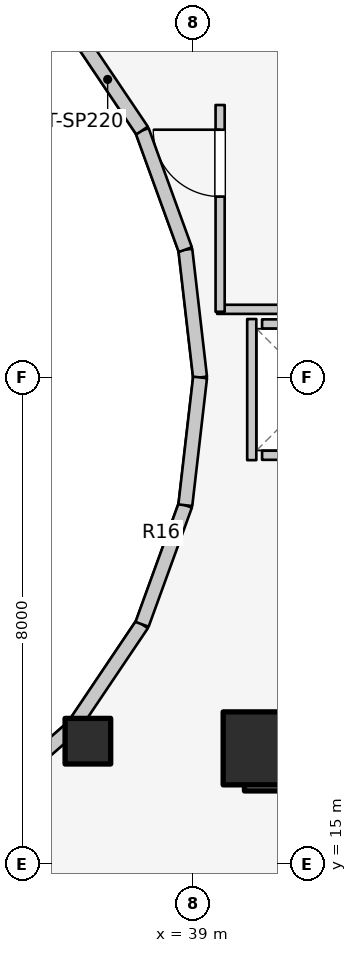
"""IFC4 building model, lengths in metres.
Left out: names, types, materials, properties, quantities, classifications, styles, units other than length and angle.
Written with IfcOpenShell. Run it as: python <this file> out.ifc"""

import sys

from ifc_helpers import new_model, si_unit, direction, frame, frame_2d, origin, origin_2d, place, context, subcontext, project, spatial, rectangle, extrude, element, fill, save


model = new_model("IFC4")
c1 = context("Model", 3, precision=1e-05, world=origin(), true_north=direction((0.0, 1.0)))
c2 = subcontext(c1, "Body", "Model", "MODEL_VIEW")
j1 = project(units=[si_unit("LENGTHUNIT", "METRE"), si_unit("PLANEANGLEUNIT", "RADIAN")], contexts=[c1])
p1 = place(None, origin())
s1 = spatial("IfcSite", under=j1, at=p1, CompositionType="ELEMENT")
p2 = place(p1, origin())
s2 = spatial("IfcBuilding", under=s1, at=p2, CompositionType="ELEMENT")
p3 = place(p2, frame((0.0, 0.0, 159.1)))
s3 = spatial("IfcBuildingStorey", under=s2, at=p3, CompositionType="ELEMENT", Elevation=159.1)
p4 = place(p3, frame((39.85, 16.55, 0.0), z_axis=(0.0, 0.0, 1.0), x_axis=(1.0, 0.0, 0.0)))
e1 = element("IfcWall", 1, at=p4, inside=s3, PredefinedType="SHEAR", context=c2, shape_type="SweptSolid", body=[
    extrude(rectangle(XDim=4.5, YDim=0.7, at=frame_2d((2.25, 0.0))), origin(), (0.0, 0.0, 1.0), 3.1),
])
p5 = place(p3, frame((40.1, 16.9, 0.0), z_axis=(0.0, 0.0, 1.0), x_axis=(1.0, 0.0, 0.0)))
e2 = element("IfcColumn", 2, at=p5, inside=s3, PredefinedType="COLUMN", context=c2, shape_type="SweptSolid", body=[
    extrude(rectangle(XDim=1.2, YDim=1.2, at=origin_2d()), origin(), (0.0, 0.0, 1.0), 3.1),
])
p6 = place(p3, frame((37.275, 17.018, 0.0), z_axis=(0.0, 0.0, 1.0), x_axis=(1.0, 0.0, 0.0)))
e3 = element("IfcColumn", 3, at=p6, inside=s3, PredefinedType="COLUMN", context=c2, shape_type="SweptSolid", body=[
    extrude(rectangle(XDim=0.75, YDim=0.75, at=origin_2d()), origin(), (0.0, 0.0, 1.0), 3.1),
])
p7 = place(p3, frame((39.12, 23.0, 0.0), z_axis=(0.0, 0.0, 1.0), x_axis=(-0.114711713601, 0.993398823617, 0.0)))
e4 = element("IfcWall", 4, at=p7, inside=s3, PredefinedType="STANDARD", context=c2, shape_type="SweptSolid", body=[
    extrude(rectangle(XDim=2.115, YDim=0.23, at=frame_2d((1.058, 0.0))), origin(), (0.0, 0.0, 1.0), 2.56),
])
p8 = place(p3, frame((38.877, 25.102, 0.0), z_axis=(0.0, 0.0, 1.0), x_axis=(-0.341423187295, 0.93990968033, 0.0)))
e5 = element("IfcWall", 5, at=p8, inside=s3, PredefinedType="STANDARD", context=c2, shape_type="SweptSolid", body=[
    extrude(rectangle(XDim=2.084, YDim=0.23, at=frame_2d((1.042, 0.0))), origin(), (0.0, 0.0, 1.0), 2.56),
])
p9 = place(p3, frame((38.166, 27.06, 0.0), z_axis=(0.0, 0.0, 1.0), x_axis=(-0.558197800898, 0.829707909492, 0.0)))
e6 = element("IfcWall", 6, at=p9, inside=s3, PredefinedType="STANDARD", context=c2, shape_type="SweptSolid", body=[
    extrude(rectangle(XDim=2.027, YDim=0.23, at=frame_2d((1.013, 0.0))), origin(), (0.0, 0.0, 1.0), 1.22),
])
p10 = place(p3, frame((35.56, 15.968, 0.0), z_axis=(0.0, 0.0, 1.0), x_axis=(0.752576694707, 0.658504607869, 0.0)))
e7 = element("IfcWall", 7, at=p10, inside=s3, PredefinedType="STANDARD", context=c2, shape_type="SweptSolid", body=[
    extrude(rectangle(XDim=1.959, YDim=0.23, at=frame_2d((0.98, 0.0))), origin(), (0.0, 0.0, 1.0), 1.22),
])
p11 = place(p3, frame((37.035, 17.258, 0.0), z_axis=(0.0, 0.0, 1.0), x_axis=(0.558197800898, 0.829707909492, 0.0)))
e8 = element("IfcWall", 8, at=p11, inside=s3, PredefinedType="STANDARD", context=c2, shape_type="SweptSolid", body=[
    extrude(rectangle(XDim=2.027, YDim=0.23, at=frame_2d((1.013, 0.0))), origin(), (0.0, 0.0, 1.0), 1.22),
])
p12 = place(p3, frame((38.166, 18.94, 0.0), z_axis=(0.0, 0.0, 1.0), x_axis=(0.341423187295, 0.93990968033, 0.0)))
e9 = element("IfcWall", 9, at=p12, inside=s3, PredefinedType="STANDARD", context=c2, shape_type="SweptSolid", body=[
    extrude(rectangle(XDim=2.084, YDim=0.23, at=frame_2d((1.042, 0.0))), origin(), (0.0, 0.0, 1.0), 2.56),
])
p13 = place(p3, frame((38.877, 20.898, 0.0), z_axis=(0.0, 0.0, 1.0), x_axis=(0.114711713601, 0.993398823617, 0.0)))
e10 = element("IfcWall", 10, at=p13, inside=s3, PredefinedType="STANDARD", context=c2, shape_type="SweptSolid", body=[
    extrude(rectangle(XDim=2.115, YDim=0.23, at=frame_2d((1.058, 0.0))), origin(), (0.0, 0.0, 1.0), 2.56),
])
for number, where, z_axis, x_axis in (
    (11, (40.14, 21.72, 0.0), (0.0, 0.0, 1.0), (1.0, 0.0, 0.0)),
    (12, (40.14, 23.88, 0.0), (0.0, 0.0, 1.0), (1.0, 0.0, 0.0)),
):
    element("IfcWall", number, at=place(p3, frame(where, z_axis=z_axis, x_axis=x_axis)), inside=s3, PredefinedType="SOLIDWALL", context=c2, shape_type="SweptSolid", body=[
        extrude(rectangle(XDim=1.82, YDim=0.15, at=frame_2d((0.91, 0.0))), origin(), (0.0, 0.0, 1.0), 2.12),
    ])
p14 = place(p3, frame((39.97, 21.64, 0.0), z_axis=(0.0, 0.0, 1.0), x_axis=(0.0, 1.0, 0.0)))
e13 = element("IfcWall", 13, at=p14, inside=s3, PredefinedType="SOLIDWALL", context=c2, shape_type="SweptSolid", body=[
    extrude(rectangle(XDim=2.32, YDim=0.15, at=frame_2d((1.16, 0.0))), origin(), (0.0, 0.0, 1.0), 2.12),
])
p15 = place(p3, frame((39.4, 24.12, 0.0), z_axis=(0.0, 0.0, 1.0), x_axis=(1.0, 0.0, 0.0)))
e14 = element("IfcWall", 14, at=p15, inside=s3, PredefinedType="PARTITIONING", context=c2, shape_type="SweptSolid", body=[
    extrude(rectangle(XDim=5.08, YDim=0.15, at=frame_2d((2.54, 0.0))), origin(), (0.0, 0.0, 1.0), 2.12),
])
p16 = place(p3, frame((39.45, 24.08, 0.0), z_axis=(0.0, 0.0, 1.0), x_axis=(0.0, 1.0, 0.0)))
e15 = element("IfcWall", 15, at=p16, inside=s3, PredefinedType="PARTITIONING", context=c2, shape_type="SweptSolid", body=[
    extrude(rectangle(XDim=3.4, YDim=0.15, at=frame_2d((1.7, 0.0))), origin(), (0.0, 0.0, 1.0), 2.575),
])
p17 = place(p16, frame((1.894, 0.0, 0.0)))
e16 = element("IfcOpeningElement", 16, at=p17, cuts=e15, PredefinedType="OPENING", context=c2, shape_type="SweptSolid", body=[
    extrude(rectangle(XDim=1.1, YDim=2.1, at=frame_2d((0.55, 1.05))), frame((0.0, 0.085, 0.0), z_axis=(0.0, -1.0, 0.0), x_axis=(1.0, 0.0, 0.0)), (0.0, 0.0, 1.0), 0.17),
])
p18 = place(p3, frame((35.55, 15.985, 0.0), z_axis=(0.0, 0.0, 1.0), x_axis=(0.525627246902, -0.850714991824, 0.0)))
e17 = element("IfcWall", 17, at=p18, inside=s3, PredefinedType="PARTITIONING", context=c2, shape_type="SweptSolid", body=[
    extrude(rectangle(XDim=2.901, YDim=0.125, at=frame_2d((1.451, 0.0))), origin(), (0.0, 0.0, 1.0), 2.019),
])
p19 = place(p17, origin())
e18 = element("IfcDoor", 18, at=p19, inside=s3, OperationType="SINGLE_SWING_RIGHT", PredefinedType="DOOR", context=c2, shape_type="SweptSolid", body=[
    extrude(rectangle(XDim=1.1, YDim=2.1, at=frame_2d((0.55, 1.05))), frame((0.0, 0.025, 0.0), z_axis=(0.0, -1.0, 0.0), x_axis=(1.0, 0.0, 0.0)), (0.0, 0.0, 1.0), 0.05),
])
fill(e16, e18)
save(model, sys.argv[1])
